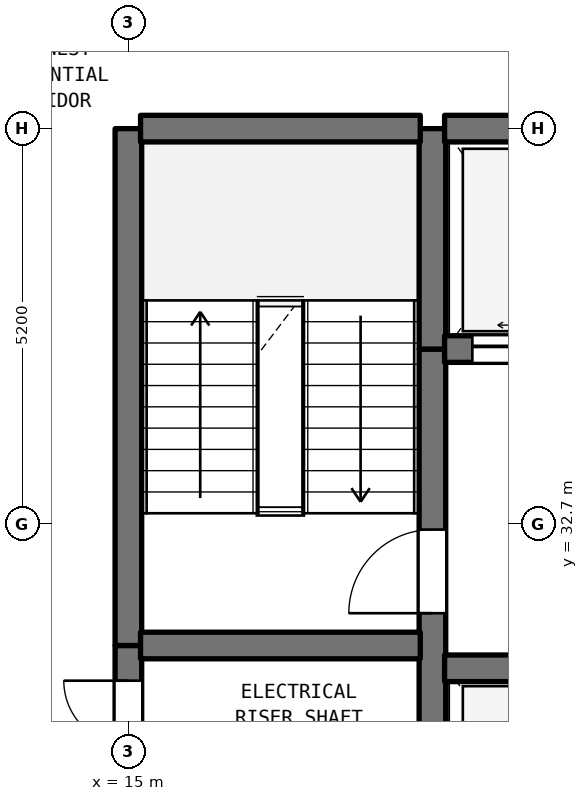
"""IFC4 building model, lengths in metres.
Left out: names, types, materials, properties, quantities, classifications, styles, units other than length and angle.
Written with IfcOpenShell. Run it as: python <this file> out.ifc"""

import sys

from ifc_helpers import new_model, si_unit, direction, frame, frame_2d, origin, place, context, subcontext, project, spatial, rectangle, extrude, element, fill, save


model = new_model("IFC4")
c1 = context("Model", 3, precision=1e-05, world=origin(), true_north=direction((0.0, 1.0)))
c2 = subcontext(c1, "Body", "Model", "MODEL_VIEW")
j1 = project(units=[si_unit("LENGTHUNIT", "METRE"), si_unit("PLANEANGLEUNIT", "RADIAN")], contexts=[c1])
p1 = place(None, origin())
s1 = spatial("IfcSite", under=j1, at=p1, CompositionType="ELEMENT")
p2 = place(p1, origin())
s2 = spatial("IfcBuilding", under=s1, at=p2, CompositionType="ELEMENT")
p3 = place(p2, frame((0.0, 0.0, 57.3)))
s3 = spatial("IfcBuildingStorey", under=s2, at=p3, CompositionType="ELEMENT", Elevation=57.3)
p4 = place(p3, frame((15.0, 29.5, 0.0), z_axis=(0.0, 0.0, 1.0), x_axis=(0.0, 1.0, 0.0)))
e1 = element("IfcWall", 1, at=p4, inside=s3, PredefinedType="SHEAR", context=c2, shape_type="SweptSolid", body=[
    extrude(rectangle(XDim=1.6, YDim=0.35, at=frame_2d((0.8, 0.0))), origin(), (0.0, 0.0, 1.0), 3.28),
])
p5 = place(p4, frame((0.287, 0.0, 0.0)))
e2 = element("IfcOpeningElement", 2, at=p5, cuts=e1, PredefinedType="OPENING", context=c2, shape_type="SweptSolid", body=[
    extrude(rectangle(XDim=0.85, YDim=2.1, at=frame_2d((0.425, 1.05))), frame((0.0, 0.185, 0.0), z_axis=(0.0, -1.0, 0.0), x_axis=(1.0, 0.0, 0.0)), (0.0, 0.0, 1.0), 0.37),
])
p6 = place(p3, frame((15.0, 31.1, 0.0), z_axis=(0.0, 0.0, 1.0), x_axis=(0.0, 1.0, 0.0)))
e3 = element("IfcWall", 3, at=p6, inside=s3, PredefinedType="SHEAR", context=c2, shape_type="SweptSolid", body=[
    extrude(rectangle(XDim=6.8, YDim=0.35, at=frame_2d((3.4, 0.0))), origin(), (0.0, 0.0, 1.0), 3.28),
])
p7 = place(p3, frame((19.0, 29.5, 0.0), z_axis=(0.0, 0.0, 1.0), x_axis=(0.0, 1.0, 0.0)))
e4 = element("IfcWall", 4, at=p7, inside=s3, PredefinedType="SHEAR", context=c2, shape_type="SweptSolid", body=[
    extrude(rectangle(XDim=5.5, YDim=0.35, at=frame_2d((2.75, 0.0))), origin(), (0.0, 0.0, 1.0), 3.28),
])
p8 = place(p7, frame((2.025, 0.0, 0.0)))
e5 = element("IfcOpeningElement", 5, at=p8, cuts=e4, PredefinedType="OPENING", context=c2, shape_type="SweptSolid", body=[
    extrude(rectangle(XDim=1.1, YDim=2.15, at=frame_2d((0.55, 1.075))), frame((0.0, 0.185, 0.0), z_axis=(0.0, -1.0, 0.0), x_axis=(1.0, 0.0, 0.0)), (0.0, 0.0, 1.0), 0.37),
])
p9 = place(p3, frame((19.0, 35.0, 0.0), z_axis=(0.0, 0.0, 1.0), x_axis=(0.0, 1.0, 0.0)))
e6 = element("IfcWall", 6, at=p9, inside=s3, PredefinedType="SHEAR", context=c2, shape_type="SweptSolid", body=[
    extrude(rectangle(XDim=2.9, YDim=0.35, at=frame_2d((1.45, 0.0))), origin(), (0.0, 0.0, 1.0), 3.28),
])
p10 = place(p3, frame((19.16, 30.8, 0.0), z_axis=(0.0, 0.0, 1.0), x_axis=(1.0, 0.0, 0.0)))
e7 = element("IfcWall", 7, at=p10, inside=s3, PredefinedType="SHEAR", context=c2, shape_type="SweptSolid", body=[
    extrude(rectangle(XDim=4.48, YDim=0.35, at=frame_2d((2.24, 0.0))), origin(), (0.0, 0.0, 1.0), 3.28),
])
p11 = place(p3, frame((15.16, 31.1, 0.0), z_axis=(0.0, 0.0, 1.0), x_axis=(1.0, 0.0, 0.0)))
e8 = element("IfcWall", 8, at=p11, inside=s3, PredefinedType="SHEAR", context=c2, shape_type="SweptSolid", body=[
    extrude(rectangle(XDim=3.68, YDim=0.35, at=frame_2d((1.84, 0.0))), origin(), (0.0, 0.0, 1.0), 3.28),
])
p12 = place(p3, frame((19.16, 35.0, 0.0), z_axis=(0.0, 0.0, 1.0), x_axis=(1.0, 0.0, 0.0)))
e9 = element("IfcWall", 9, at=p12, inside=s3, PredefinedType="SHEAR", context=c2, shape_type="SweptSolid", body=[
    extrude(rectangle(XDim=11.48, YDim=0.35, at=frame_2d((5.74, 0.0))), origin(), (0.0, 0.0, 1.0), 3.28),
])
p13 = place(p12, frame((0.365, 0.0, 0.0)))
e10 = element("IfcOpeningElement", 10, at=p13, cuts=e9, PredefinedType="OPENING", context=c2, shape_type="SweptSolid", body=[
    extrude(rectangle(XDim=1.35, YDim=2.2, at=frame_2d((0.675, 1.1))), frame((0.0, 0.185, 0.0), z_axis=(0.0, -1.0, 0.0), x_axis=(1.0, 0.0, 0.0)), (0.0, 0.0, 1.0), 0.37),
])
p14 = place(p12, frame((2.765, 0.0, 0.0)))
e11 = element("IfcOpeningElement", 11, at=p14, cuts=e9, PredefinedType="OPENING", context=c2, shape_type="SweptSolid", body=[
    extrude(rectangle(XDim=1.35, YDim=2.2, at=frame_2d((0.675, 1.1))), frame((0.0, 0.185, 0.0), z_axis=(0.0, -1.0, 0.0), x_axis=(1.0, 0.0, 0.0)), (0.0, 0.0, 1.0), 0.37),
])
p15 = place(p12, frame((4.915, 0.0, 0.0)))
e12 = element("IfcOpeningElement", 12, at=p15, cuts=e9, PredefinedType="OPENING", context=c2, shape_type="SweptSolid", body=[
    extrude(rectangle(XDim=1.2, YDim=2.2, at=frame_2d((0.6, 1.1))), frame((0.0, 0.185, 0.0), z_axis=(0.0, -1.0, 0.0), x_axis=(1.0, 0.0, 0.0)), (0.0, 0.0, 1.0), 0.37),
])
p16 = place(p12, frame((6.665, 0.0, 0.0)))
e13 = element("IfcOpeningElement", 13, at=p16, cuts=e9, PredefinedType="OPENING", context=c2, shape_type="SweptSolid", body=[
    extrude(rectangle(XDim=1.2, YDim=2.2, at=frame_2d((0.6, 1.1))), frame((0.0, 0.185, 0.0), z_axis=(0.0, -1.0, 0.0), x_axis=(1.0, 0.0, 0.0)), (0.0, 0.0, 1.0), 0.37),
])
p17 = place(p12, frame((8.415, 0.0, 0.0)))
e14 = element("IfcOpeningElement", 14, at=p17, cuts=e9, PredefinedType="OPENING", context=c2, shape_type="SweptSolid", body=[
    extrude(rectangle(XDim=1.2, YDim=2.2, at=frame_2d((0.6, 1.1))), frame((0.0, 0.185, 0.0), z_axis=(0.0, -1.0, 0.0), x_axis=(1.0, 0.0, 0.0)), (0.0, 0.0, 1.0), 0.37),
])
p18 = place(p12, frame((10.16, 0.0, 0.0)))
e15 = element("IfcOpeningElement", 15, at=p18, cuts=e9, PredefinedType="OPENING", context=c2, shape_type="SweptSolid", body=[
    extrude(rectangle(XDim=1.2, YDim=2.2, at=frame_2d((0.6, 1.1))), frame((0.0, 0.185, 0.0), z_axis=(0.0, -1.0, 0.0), x_axis=(1.0, 0.0, 0.0)), (0.0, 0.0, 1.0), 0.37),
])
p19 = place(p3, frame((15.16, 37.9, 0.0), z_axis=(0.0, 0.0, 1.0), x_axis=(1.0, 0.0, 0.0)))
e16 = element("IfcWall", 16, at=p19, inside=s3, PredefinedType="SHEAR", context=c2, shape_type="SweptSolid", body=[
    extrude(rectangle(XDim=3.68, YDim=0.35, at=frame_2d((1.84, 0.0))), origin(), (0.0, 0.0, 1.0), 3.28),
])
p20 = place(p3, frame((19.16, 37.9, 0.0), z_axis=(0.0, 0.0, 1.0), x_axis=(1.0, 0.0, 0.0)))
e17 = element("IfcWall", 17, at=p20, inside=s3, PredefinedType="SHEAR", context=c2, shape_type="SweptSolid", body=[
    extrude(rectangle(XDim=11.48, YDim=0.35, at=frame_2d((5.74, 0.0))), origin(), (0.0, 0.0, 1.0), 3.28),
])
p21 = place(p5, origin())
e18 = element("IfcDoor", 18, at=p21, inside=s3, OperationType="SINGLE_SWING_RIGHT", PredefinedType="DOOR", context=c2, shape_type="SweptSolid", body=[
    extrude(rectangle(XDim=0.85, YDim=2.1, at=frame_2d((0.425, 1.05))), frame((0.0, 0.025, 0.0), z_axis=(0.0, -1.0, 0.0), x_axis=(1.0, 0.0, 0.0)), (0.0, 0.0, 1.0), 0.05),
])
fill(e2, e18)
p22 = place(p8, origin())
e19 = element("IfcDoor", 19, at=p22, inside=s3, OperationType="SINGLE_SWING_LEFT", PredefinedType="DOOR", context=c2, shape_type="SweptSolid", body=[
    extrude(rectangle(XDim=1.1, YDim=2.15, at=frame_2d((0.55, 1.075))), frame((0.0, 0.025, 0.0), z_axis=(0.0, -1.0, 0.0), x_axis=(1.0, 0.0, 0.0)), (0.0, 0.0, 1.0), 0.05),
])
fill(e5, e19)
p23 = place(p13, origin())
e20 = element("IfcDoor", 20, at=p23, inside=s3, OperationType="DOUBLE_DOOR_SLIDING", PredefinedType="DOOR", context=c2, shape_type="SweptSolid", body=[
    extrude(rectangle(XDim=1.35, YDim=2.2, at=frame_2d((0.675, 1.1))), frame((0.0, 0.025, 0.0), z_axis=(0.0, -1.0, 0.0), x_axis=(1.0, 0.0, 0.0)), (0.0, 0.0, 1.0), 0.05),
])
fill(e10, e20)
save(model, sys.argv[1])
